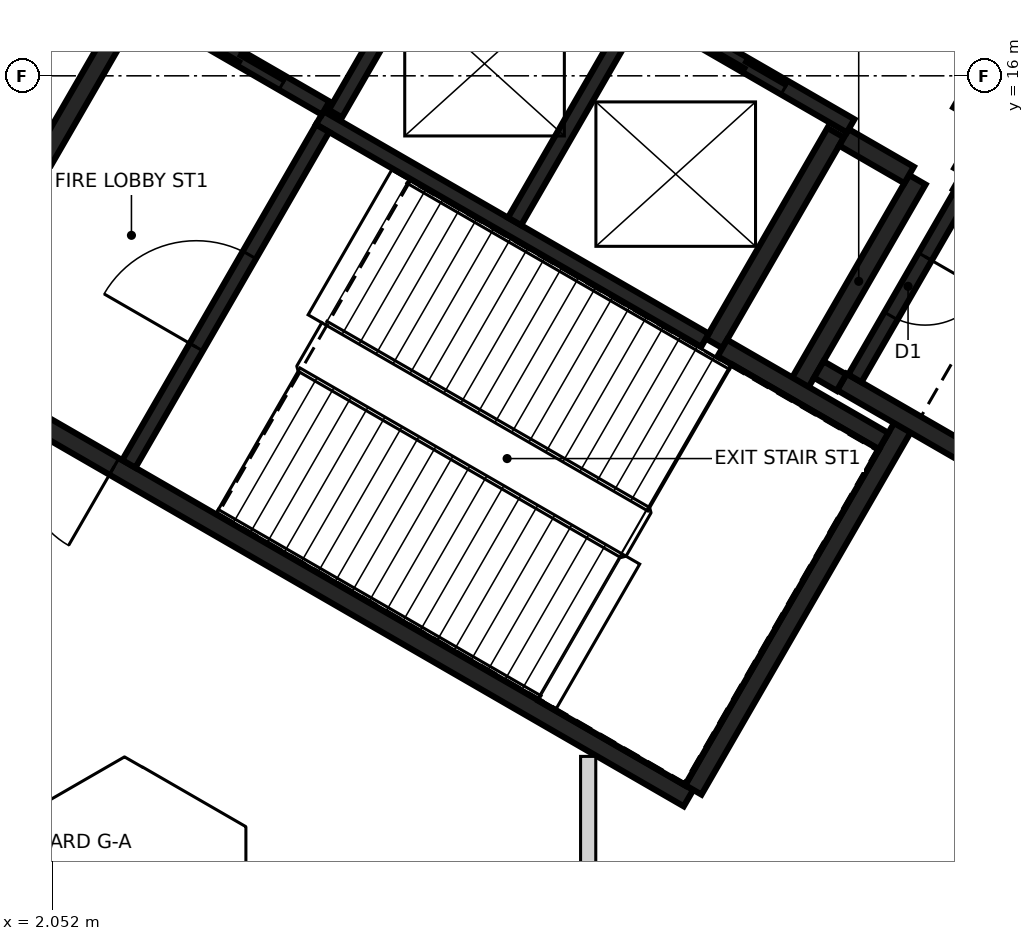
"""IFC4 building model, lengths in metres.
Left out: names, types, materials, properties, quantities, classifications, styles, units other than length and angle.
Written with IfcOpenShell. Run it as: python <this file> out.ifc"""

import sys

from ifc_helpers import new_model, si_unit, direction, frame, frame_2d, origin, place, context, subcontext, project, spatial, rectangle, extrude, element, fill, save


model = new_model("IFC4")
c1 = context("Model", 3, precision=1e-05, world=origin(), true_north=direction((0.0, 1.0)))
c2 = subcontext(c1, "Body", "Model", "MODEL_VIEW")
j1 = project(units=[si_unit("LENGTHUNIT", "METRE"), si_unit("PLANEANGLEUNIT", "RADIAN")], contexts=[c1])
p1 = place(None, origin())
s1 = spatial("IfcSite", under=j1, at=p1, CompositionType="ELEMENT")
p2 = place(p1, origin())
s2 = spatial("IfcBuilding", under=s1, at=p2, CompositionType="ELEMENT")
p3 = place(p2, frame((0.0, 0.0, 169.6)))
s3 = spatial("IfcBuildingStorey", under=s2, at=p3, CompositionType="ELEMENT", Elevation=169.6)
p4 = place(p3, frame((10.42, 6.498, 0.0), z_axis=(0.0, 0.0, 1.0), x_axis=(-0.866021906294, 0.500006057782, 0.0)))
e1 = element("IfcWall", 1, at=p4, inside=s3, PredefinedType="SHEAR", context=c2, shape_type="SweptSolid", body=[
    extrude(rectangle(XDim=11.55, YDim=0.25, at=frame_2d((5.775, 0.0))), origin(), (0.0, 0.0, 1.0), 5.65),
])
p5 = place(p4, frame((10.025, 0.0, 0.0)))
e2 = element("IfcOpeningElement", 2, at=p5, cuts=e1, PredefinedType="OPENING", context=c2, shape_type="SweptSolid", body=[
    extrude(rectangle(XDim=1.2, YDim=2.1, at=frame_2d((0.6, 1.05))), frame((0.0, 0.135, 0.0), z_axis=(0.0, -1.0, 0.0), x_axis=(1.0, 0.0, 0.0)), (0.0, 0.0, 1.0), 0.27),
])
p6 = place(p4, frame((8.725, 0.0, 0.0)))
e3 = element("IfcOpeningElement", 3, at=p6, cuts=e1, PredefinedType="OPENING", context=c2, shape_type="SweptSolid", body=[
    extrude(rectangle(XDim=1.2, YDim=2.1, at=frame_2d((0.6, 1.05))), frame((0.0, 0.135, 0.0), z_axis=(0.0, -1.0, 0.0), x_axis=(1.0, 0.0, 0.0)), (0.0, 0.0, 1.0), 0.27),
])
p7 = place(p3, frame((0.48, 12.381, 0.0), z_axis=(0.0, 0.0, 1.0), x_axis=(0.49999885962, 0.866026062182, 0.0)))
e4 = element("IfcWall", 4, at=p7, inside=s3, PredefinedType="SHEAR", context=c2, shape_type="SweptSolid", body=[
    extrude(rectangle(XDim=5.225, YDim=0.25, at=frame_2d((2.612, 0.0))), origin(), (0.0, 0.0, 1.0), 5.65),
])
p8 = place(p3, frame((13.238, 11.378, 0.0), z_axis=(0.0, 0.0, 1.0), x_axis=(-0.500008851346, -0.866020293397, 0.0)))
e5 = element("IfcWall", 5, at=p8, inside=s3, PredefinedType="SHEAR", context=c2, shape_type="SweptSolid", body=[
    extrude(rectangle(XDim=5.51, YDim=0.25, at=frame_2d((2.755, 0.0))), origin(), (0.0, 0.0, 1.0), 5.65),
])
p9 = place(p3, frame((12.357, 15.252, 0.0), z_axis=(0.0, 0.0, 1.0), x_axis=(-0.500028443584, -0.866008981251, 0.0)))
e6 = element("IfcWall", 6, at=p9, inside=s3, PredefinedType="SHEAR", context=c2, shape_type="SweptSolid", body=[
    extrude(rectangle(XDim=3.2, YDim=0.25, at=frame_2d((1.6, 0.0))), origin(), (0.0, 0.0, 1.0), 5.65),
])
p10 = place(p3, frame((14.918, 10.54, 0.0), z_axis=(0.0, 0.0, 1.0), x_axis=(-0.866063538972, 0.499933942099, 0.0)))
e7 = element("IfcWall", 7, at=p10, inside=s3, PredefinedType="SHEAR", context=c2, shape_type="SweptSolid", body=[
    extrude(rectangle(XDim=2.865, YDim=0.25, at=frame_2d((1.432, 0.0))), origin(), (0.0, 0.0, 1.0), 5.65),
])
p11 = place(p3, frame((13.963, 14.614, 0.0), z_axis=(0.0, 0.0, 1.0), x_axis=(0.866042235819, -0.499970844928, 0.0)))
e8 = element("IfcWall", 8, at=p11, inside=s3, PredefinedType="SHEAR", context=c2, shape_type="SweptSolid", body=[
    extrude(rectangle(XDim=2.865, YDim=0.25, at=frame_2d((1.432, 0.0))), origin(), (0.0, 0.0, 1.0), 5.65),
])
p12 = place(p3, frame((11.888, 11.961, 0.0), z_axis=(0.0, 0.0, 1.0), x_axis=(0.500003324108, 0.866023484601, 0.0)))
e9 = element("IfcWall", 9, at=p12, inside=s3, PredefinedType="SHEAR", context=c2, shape_type="SweptSolid", body=[
    extrude(rectangle(XDim=3.085, YDim=0.25, at=frame_2d((1.542, 0.0))), origin(), (0.0, 0.0, 1.0), 5.65),
])
p13 = place(p3, frame((10.865, 12.418, 0.0), z_axis=(0.0, 0.0, 1.0), x_axis=(0.866026229868, -0.499998569178, 0.0)))
e10 = element("IfcWall", 10, at=p13, inside=s3, PredefinedType="SHEAR", context=c2, shape_type="SweptSolid", body=[
    extrude(rectangle(XDim=2.449, YDim=0.25, at=frame_2d((1.225, 0.0))), origin(), (0.0, 0.0, 1.0), 5.65),
])
p14 = place(p3, frame((14.945, 17.135, 0.0), z_axis=(0.0, 0.0, 1.0), x_axis=(-0.499983108224, -0.866035156036, 0.0)))
e11 = element("IfcWall", 11, at=p14, inside=s3, PredefinedType="SHEAR", context=c2, shape_type="SweptSolid", body=[
    extrude(rectangle(XDim=1.865, YDim=0.25, at=frame_2d((0.932, 0.0))), origin(), (0.0, 0.0, 1.0), 5.65),
])
p15 = place(p14, frame((0.535, 0.0, 0.0)))
e12 = element("IfcOpeningElement", 12, at=p15, cuts=e11, PredefinedType="OPENING", context=c2, shape_type="SweptSolid", body=[
    extrude(rectangle(XDim=1.25, YDim=2.1, at=frame_2d((0.625, 1.05))), frame((0.0, 0.135, 0.0), z_axis=(0.0, -1.0, 0.0), x_axis=(1.0, 0.0, 0.0)), (0.0, 0.0, 1.0), 0.27),
])
p16 = place(p3, frame((13.322, 14.695, 0.0), z_axis=(0.0, 0.0, 1.0), x_axis=(-0.866017078145, 0.500014420154, 0.0)))
e13 = element("IfcWall", 13, at=p16, inside=s3, PredefinedType="SHEAR", context=c2, shape_type="SweptSolid", body=[
    extrude(rectangle(XDim=0.989, YDim=0.25, at=frame_2d((0.495, 0.0))), origin(), (0.0, 0.0, 1.0), 5.65),
])
p17 = place(p3, frame((14.368, 15.315, 0.0), z_axis=(0.0, 0.0, 1.0), x_axis=(-0.499897359611, -0.866084655132, 0.0)))
e14 = element("IfcWall", 14, at=p17, inside=s3, PredefinedType="SHEAR", context=c2, shape_type="SweptSolid", body=[
    extrude(rectangle(XDim=0.685, YDim=0.25, at=frame_2d((0.342, 0.0))), origin(), (0.0, 0.0, 1.0), 5.65),
])
p18 = place(p3, frame((12.433, 11.964, 0.0), z_axis=(0.0, 0.0, 1.0), x_axis=(-0.866055875208, 0.499947218231, 0.0)))
e15 = element("IfcWall", 15, at=p18, inside=s3, PredefinedType="SHEAR", context=c2, shape_type="SweptSolid", body=[
    extrude(rectangle(XDim=0.345, YDim=0.25, at=frame_2d((0.172, 0.0))), origin(), (0.0, 0.0, 1.0), 5.65),
])
p19 = place(p3, frame((12.552, 15.342, 0.0), z_axis=(0.0, 0.0, 1.0), x_axis=(-0.866030299012, 0.499991521122, 0.0)))
e16 = element("IfcWall", 16, at=p19, inside=s3, PredefinedType="SHEAR", context=c2, shape_type="SweptSolid", body=[
    extrude(rectangle(XDim=6.1, YDim=0.2, at=frame_2d((3.05, 0.0))), origin(), (0.0, 0.0, 1.0), 5.65),
])
p20 = place(p19, frame((1.0, 0.0, 0.0)))
e17 = element("IfcOpeningElement", 17, at=p20, cuts=e16, PredefinedType="OPENING", context=c2, shape_type="SweptSolid", body=[
    extrude(rectangle(XDim=1.2, YDim=2.1, at=frame_2d((0.6, 1.05))), frame((0.0, 0.11, 0.0), z_axis=(0.0, -1.0, 0.0), x_axis=(1.0, 0.0, 0.0)), (0.0, 0.0, 1.0), 0.22),
])
p21 = place(p19, frame((3.982, 0.0, 0.0)))
e18 = element("IfcOpeningElement", 18, at=p21, cuts=e16, PredefinedType="OPENING", context=c2, shape_type="SweptSolid", body=[
    extrude(rectangle(XDim=1.2, YDim=2.1, at=frame_2d((0.6, 1.05))), frame((0.0, 0.11, 0.0), z_axis=(0.0, -1.0, 0.0), x_axis=(1.0, 0.0, 0.0)), (0.0, 0.0, 1.0), 0.22),
])
p22 = place(p3, frame((10.636, 12.521, 0.0), z_axis=(0.0, 0.0, 1.0), x_axis=(-0.866013252188, 0.500021046592, 0.0)))
e19 = element("IfcWall", 19, at=p22, inside=s3, PredefinedType="SHEAR", context=c2, shape_type="SweptSolid", body=[
    extrude(rectangle(XDim=5.851, YDim=0.2, at=frame_2d((2.925, 0.0))), origin(), (0.0, 0.0, 1.0), 5.65),
])
p23 = place(p3, frame((3.057, 10.895, 0.0), z_axis=(0.0, 0.0, 1.0), x_axis=(0.500027839223, 0.866009330205, 0.0)))
e20 = element("IfcWall", 20, at=p23, inside=s3, PredefinedType="SHEAR", context=c2, shape_type="SweptSolid", body=[
    extrude(rectangle(XDim=5.098, YDim=0.2, at=frame_2d((2.549, 0.0))), origin(), (0.0, 0.0, 1.0), 5.65),
])
p24 = place(p23, frame((1.774, 0.0, 0.0)))
e21 = element("IfcOpeningElement", 21, at=p24, cuts=e20, PredefinedType="OPENING", context=c2, shape_type="SweptSolid", body=[
    extrude(rectangle(XDim=1.4, YDim=2.1, at=frame_2d((0.7, 1.05))), frame((0.0, 0.11, 0.0), z_axis=(0.0, -1.0, 0.0), x_axis=(1.0, 0.0, 0.0)), (0.0, 0.0, 1.0), 0.22),
])
p25 = place(p3, frame((8.132, 14.084, 0.0), z_axis=(0.0, 0.0, 1.0), x_axis=(0.500030834389, 0.86600760081, 0.0)))
e22 = element("IfcWall", 22, at=p25, inside=s3, PredefinedType="SHEAR", context=c2, shape_type="SweptSolid", body=[
    extrude(rectangle(XDim=3.198, YDim=0.2, at=frame_2d((1.599, 0.0))), origin(), (0.0, 0.0, 1.0), 5.65),
])
p26 = place(p3, frame((14.008, 14.442, 0.0), z_axis=(0.0, 0.0, 1.0), x_axis=(-0.499986818241, -0.866033014143, 0.0)))
e23 = element("IfcWall", 23, at=p26, inside=s3, PredefinedType="SHEAR", context=c2, shape_type="SweptSolid", body=[
    extrude(rectangle(XDim=2.798, YDim=0.2, at=frame_2d((1.399, 0.0))), origin(), (0.0, 0.0, 1.0), 5.65),
])
p27 = place(p26, frame((0.949, 0.0, 0.0)))
e24 = element("IfcOpeningElement", 24, at=p27, cuts=e23, PredefinedType="OPENING", context=c2, shape_type="SweptSolid", body=[
    extrude(rectangle(XDim=0.9, YDim=2.1, at=frame_2d((0.45, 1.05))), frame((0.0, 0.11, 0.0), z_axis=(0.0, -1.0, 0.0), x_axis=(1.0, 0.0, 0.0)), (0.0, 0.0, 1.0), 0.22),
])
p28 = place(p3, frame((7.324, 18.187, 0.0), z_axis=(0.0, 0.0, 1.0), x_axis=(-0.499967891604, -0.866043940782, 0.0)))
e25 = element("IfcWall", 25, at=p28, inside=s3, PredefinedType="SHEAR", context=c2, shape_type="SweptSolid", body=[
    extrude(rectangle(XDim=3.1, YDim=0.2, at=frame_2d((1.55, 0.0))), origin(), (0.0, 0.0, 1.0), 5.65),
])
p29 = place(p3, frame((5.646, 15.576, 0.0), z_axis=(0.0, 0.0, 1.0), x_axis=(-0.866018407898, 0.500012117035, 0.0)))
e26 = element("IfcWall", 26, at=p29, inside=s3, PredefinedType="SHEAR", context=c2, shape_type="SweptSolid", body=[
    extrude(rectangle(XDim=2.651, YDim=0.2, at=frame_2d((1.325, 0.0))), origin(), (0.0, 0.0, 1.0), 5.65),
])
p30 = place(p29, frame((0.652, 0.0, 0.0)))
e27 = element("IfcOpeningElement", 27, at=p30, cuts=e26, PredefinedType="OPENING", context=c2, shape_type="SweptSolid", body=[
    extrude(rectangle(XDim=1.3, YDim=2.1, at=frame_2d((0.65, 1.05))), frame((0.0, 0.11, 0.0), z_axis=(0.0, -1.0, 0.0), x_axis=(1.0, 0.0, 0.0)), (0.0, 0.0, 1.0), 0.22),
])
p31 = place(p3, frame((-1.985, 12.265, 0.0), z_axis=(0.0, 0.0, 1.0), x_axis=(0.500003233276, 0.866023537044, 0.0)))
e28 = element("IfcWall", 28, at=p31, inside=s3, PredefinedType="PARTITIONING", context=c2, shape_type="SweptSolid", body=[
    extrude(rectangle(XDim=13.448, YDim=0.2, at=frame_2d((6.724, 0.0))), origin(), (0.0, 0.0, 1.0), 4.75),
])
p32 = place(p31, frame((10.427, 0.0, 0.0)))
e29 = element("IfcOpeningElement", 29, at=p32, cuts=e28, PredefinedType="OPENING", context=c2, shape_type="SweptSolid", body=[
    extrude(rectangle(XDim=0.9, YDim=2.1, at=frame_2d((0.45, 1.05))), frame((0.0, 0.11, 0.0), z_axis=(0.0, -1.0, 0.0), x_axis=(1.0, 0.0, 0.0)), (0.0, 0.0, 1.0), 0.22),
])
p33 = place(p31, frame((2.568, 0.0, 0.0)))
e30 = element("IfcOpeningElement", 30, at=p33, cuts=e28, PredefinedType="OPENING", context=c2, shape_type="SweptSolid", body=[
    extrude(rectangle(XDim=1.0, YDim=2.1, at=frame_2d((0.5, 1.05))), frame((0.0, 0.11, 0.0), z_axis=(0.0, -1.0, 0.0), x_axis=(1.0, 0.0, 0.0)), (0.0, 0.0, 1.0), 0.22),
])
p34 = place(p3, frame((9.1, -4.372, 0.0), z_axis=(0.0, 0.0, 1.0), x_axis=(0.0, 1.0, 0.0)))
e31 = element("IfcWall", 31, at=p34, inside=s3, PredefinedType="PARTITIONING", context=c2, shape_type="SweptSolid", body=[
    extrude(rectangle(XDim=11.418, YDim=0.2, at=frame_2d((5.709, 0.0))), origin(), (0.0, 0.0, 1.0), 5.65),
])
p35 = place(p34, frame((7.424, 0.0, 0.0)))
e32 = element("IfcOpeningElement", 32, at=p35, cuts=e31, PredefinedType="OPENING", context=c2, shape_type="SweptSolid", body=[
    extrude(rectangle(XDim=1.0, YDim=2.1, at=frame_2d((0.5, 1.05))), frame((0.0, 0.11, 0.0), z_axis=(0.0, -1.0, 0.0), x_axis=(1.0, 0.0, 0.0)), (0.0, 0.0, 1.0), 0.22),
])
p36 = place(p30, origin())
e33 = element("IfcDoor", 33, at=p36, inside=s3, OperationType="SLIDING_TO_LEFT", PredefinedType="DOOR", context=c2, shape_type="SweptSolid", body=[
    extrude(rectangle(XDim=1.3, YDim=2.1, at=frame_2d((0.65, 1.05))), frame((0.0, 0.025, 0.0), z_axis=(0.0, -1.0, 0.0), x_axis=(1.0, 0.0, 0.0)), (0.0, 0.0, 1.0), 0.05),
])
fill(e27, e33)
p37 = place(p20, origin())
e34 = element("IfcDoor", 34, at=p37, inside=s3, OperationType="DOUBLE_DOOR_SLIDING", PredefinedType="DOOR", context=c2, shape_type="SweptSolid", body=[
    extrude(rectangle(XDim=1.2, YDim=2.1, at=frame_2d((0.6, 1.05))), frame((0.0, 0.025, 0.0), z_axis=(0.0, -1.0, 0.0), x_axis=(1.0, 0.0, 0.0)), (0.0, 0.0, 1.0), 0.05),
])
fill(e17, e34)
p38 = place(p6, origin())
e35 = element("IfcDoor", 35, at=p38, inside=s3, OperationType="SINGLE_SWING_RIGHT", PredefinedType="DOOR", context=c2, shape_type="SweptSolid", body=[
    extrude(rectangle(XDim=1.2, YDim=2.1, at=frame_2d((0.6, 1.05))), frame((0.0, 0.025, 0.0), z_axis=(0.0, -1.0, 0.0), x_axis=(1.0, 0.0, 0.0)), (0.0, 0.0, 1.0), 0.05),
])
fill(e3, e35)
p39 = place(p24, origin())
e36 = element("IfcDoor", 36, at=p39, inside=s3, OperationType="SINGLE_SWING_LEFT", PredefinedType="DOOR", context=c2, shape_type="SweptSolid", body=[
    extrude(rectangle(XDim=1.4, YDim=2.1, at=frame_2d((0.7, 1.05))), frame((0.0, 0.025, 0.0), z_axis=(0.0, -1.0, 0.0), x_axis=(1.0, 0.0, 0.0)), (0.0, 0.0, 1.0), 0.05),
])
fill(e21, e36)
p40 = place(p27, origin())
e37 = element("IfcDoor", 37, at=p40, inside=s3, OperationType="SINGLE_SWING_RIGHT", PredefinedType="DOOR", context=c2, shape_type="SweptSolid", body=[
    extrude(rectangle(XDim=0.9, YDim=2.1, at=frame_2d((0.45, 1.05))), frame((0.0, 0.025, 0.0), z_axis=(0.0, -1.0, 0.0), x_axis=(1.0, 0.0, 0.0)), (0.0, 0.0, 1.0), 0.05),
])
fill(e24, e37)
save(model, sys.argv[1])
